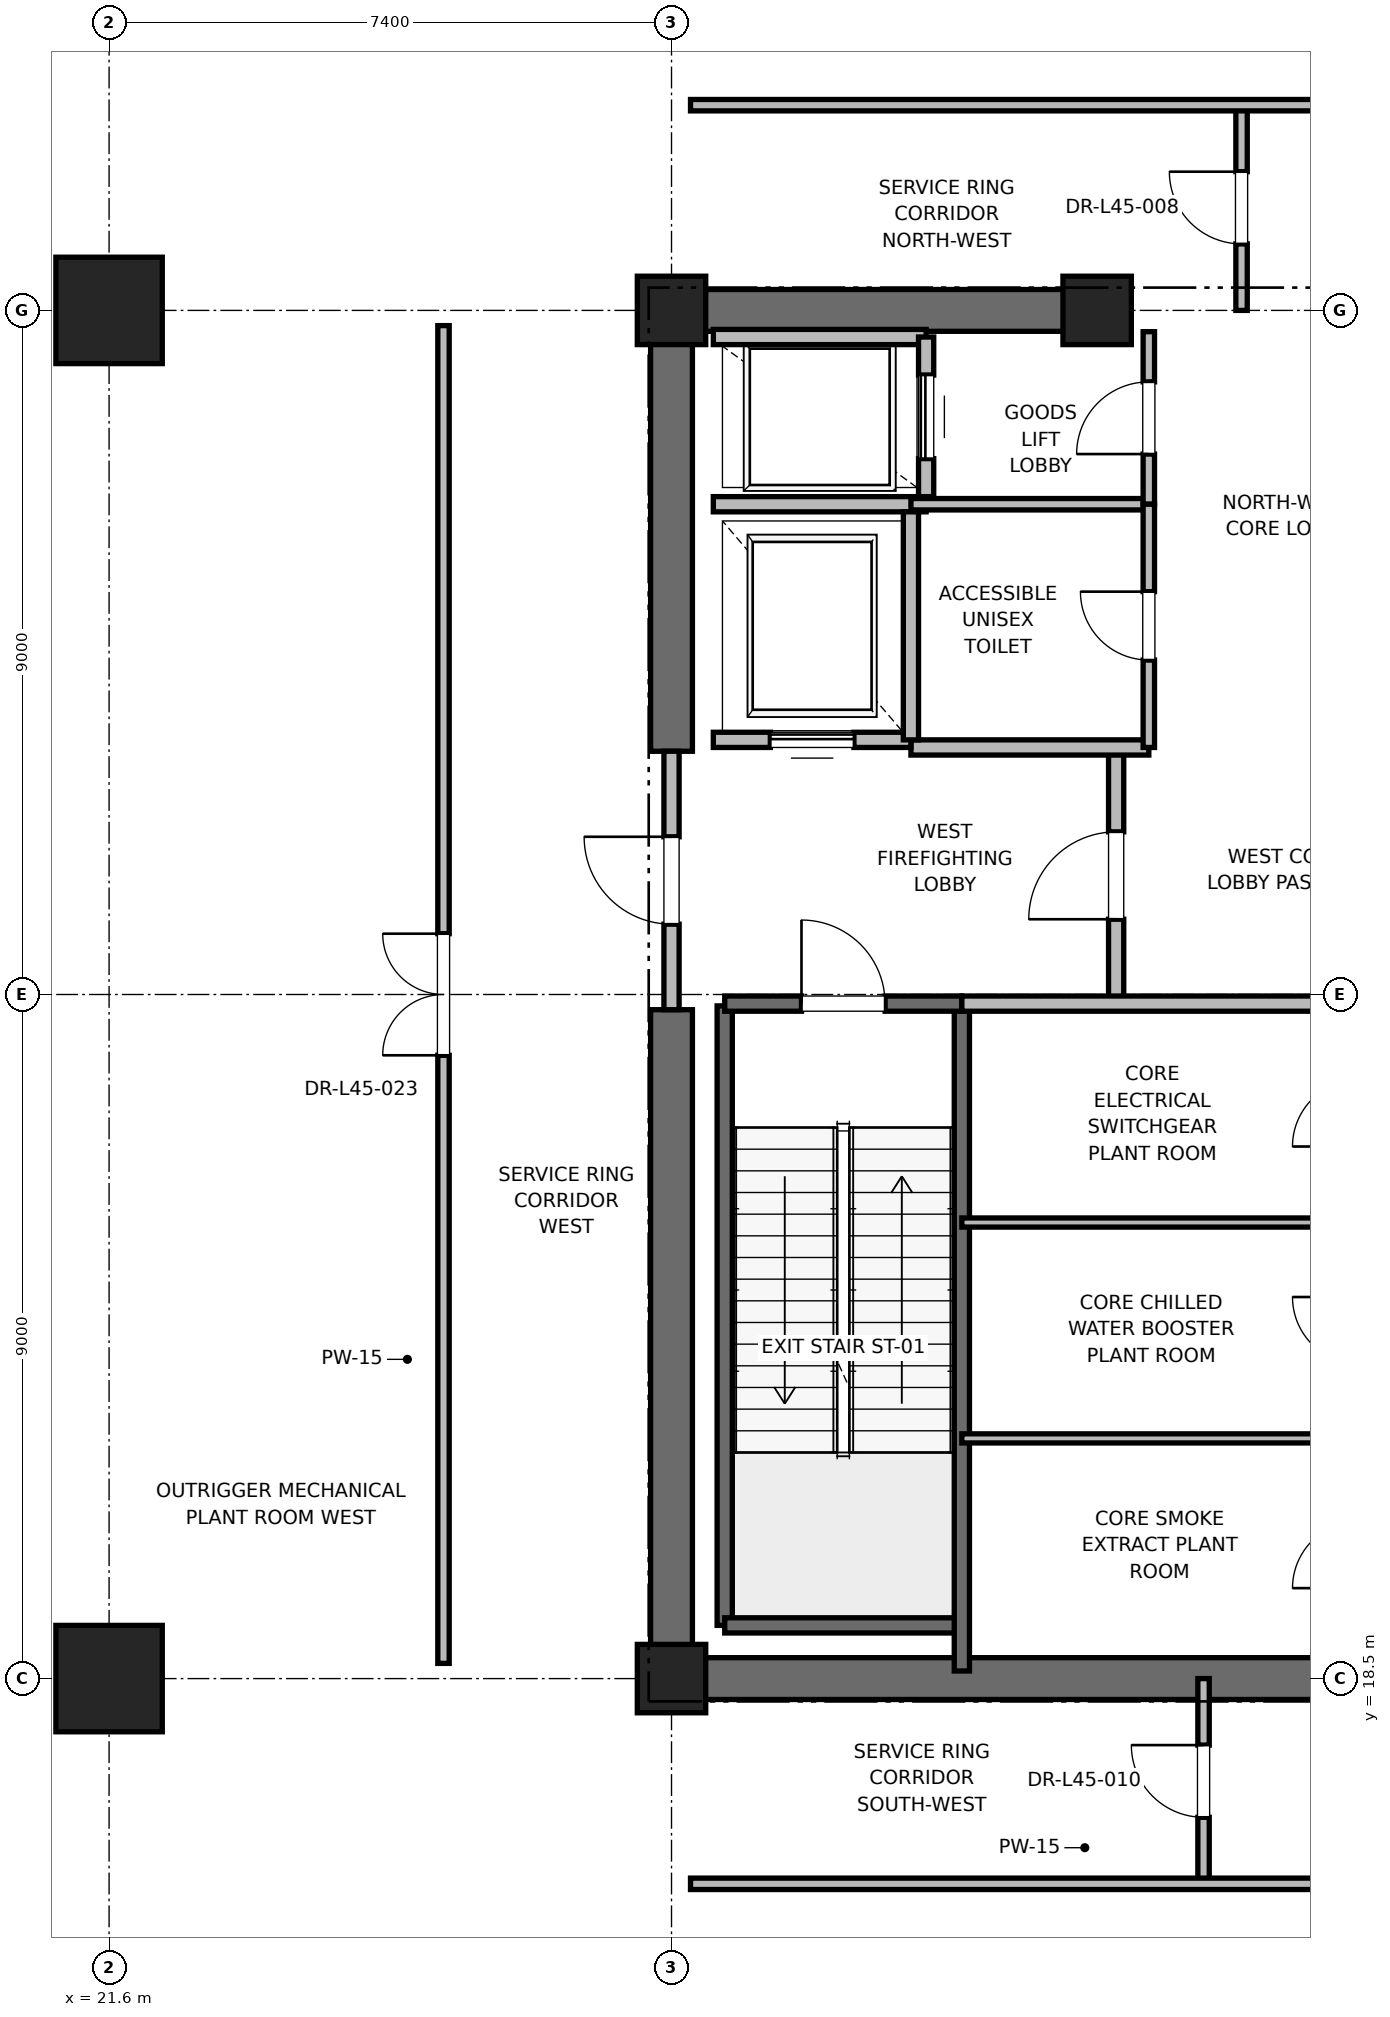
"""IFC4 building model, lengths in metres.
Left out: names, types, materials, properties, quantities, classifications, styles, units other than length and angle.
Written with IfcOpenShell. Run it as: python <this file> out.ifc"""

import sys

from ifc_helpers import new_model, si_unit, direction, frame, frame_2d, origin, origin_2d, place, context, subcontext, project, spatial, rectangle, extrude, element, fill, save


model = new_model("IFC4")
c1 = context("Model", 3, precision=1e-05, world=origin(), true_north=direction((0.0, 1.0)))
c2 = subcontext(c1, "Body", "Model", "MODEL_VIEW")
j1 = project(units=[si_unit("LENGTHUNIT", "METRE"), si_unit("PLANEANGLEUNIT", "RADIAN")], contexts=[c1])
p1 = place(None, origin())
s1 = spatial("IfcSite", under=j1, at=p1, CompositionType="ELEMENT")
p2 = place(p1, origin())
s2 = spatial("IfcBuilding", under=s1, at=p2, CompositionType="ELEMENT")
p3 = place(p2, frame((0.0, 0.0, 194.8)))
s3 = spatial("IfcBuildingStorey", under=s2, at=p3, CompositionType="ELEMENT", Elevation=194.8)
for number, where, z_axis, x_axis in (
    (1, (21.6, 18.5, 0.0), (0.0, 0.0, 1.0), (1.0, 0.0, 0.0)),
    (2, (21.6, 36.5, 0.0), (0.0, 0.0, 1.0), (1.0, 0.0, 0.0)),
):
    element("IfcColumn", number, at=place(p3, frame(where, z_axis=z_axis, x_axis=x_axis)), inside=s3, PredefinedType="COLUMN", context=c2, shape_type="SweptSolid", body=[
        extrude(rectangle(XDim=1.4, YDim=1.4, at=origin_2d()), origin(), (0.0, 0.0, 1.0), 5.4),
    ])
for number, where, z_axis, x_axis in (
    (3, (29.0, 18.5, 0.0), (0.0, 0.0, 1.0), (1.0, 0.0, 0.0)),
    (4, (29.0, 36.5, 0.0), (0.0, 0.0, 1.0), (1.0, 0.0, 0.0)),
    (5, (34.6, 36.5, 0.0), (0.0, 0.0, 1.0), (1.0, 0.0, 0.0)),
):
    element("IfcColumn", number, at=place(p3, frame(where, z_axis=z_axis, x_axis=x_axis)), inside=s3, PredefinedType="PILASTER", context=c2, shape_type="SweptSolid", body=[
        extrude(rectangle(XDim=0.9, YDim=0.9, at=origin_2d()), origin(), (0.0, 0.0, 1.0), 5.4),
    ])
p4 = place(p3, frame((29.0, 18.5, 0.0), z_axis=(0.0, 0.0, 1.0), x_axis=(1.0, 0.0, 0.0)))
e6 = element("IfcWall", 6, at=p4, inside=s3, PredefinedType="SHEAR", context=c2, shape_type="SweptSolid", body=[
    extrude(rectangle(XDim=9.2, YDim=0.55, at=frame_2d((4.6, 0.0))), origin(), (0.0, 0.0, 1.0), 5.1),
])
p5 = place(p3, frame((29.0, 36.5, 0.0), z_axis=(0.0, 0.0, 1.0), x_axis=(1.0, 0.0, 0.0)))
e7 = element("IfcWall", 7, at=p5, inside=s3, PredefinedType="SHEAR", context=c2, shape_type="SweptSolid", body=[
    extrude(rectangle(XDim=5.8, YDim=0.55, at=frame_2d((2.9, 0.0))), origin(), (0.0, 0.0, 1.0), 5.1),
])
p6 = place(p3, frame((29.0, 18.5, 0.0), z_axis=(0.0, 0.0, 1.0), x_axis=(0.0, 1.0, 0.0)))
e8 = element("IfcWall", 8, at=p6, inside=s3, PredefinedType="SHEAR", context=c2, shape_type="SweptSolid", body=[
    extrude(rectangle(XDim=8.8, YDim=0.55, at=frame_2d((4.4, 0.0))), origin(), (0.0, 0.0, 1.0), 5.1),
])
p7 = place(p3, frame((29.0, 30.7, 0.0), z_axis=(0.0, 0.0, 1.0), x_axis=(0.0, 1.0, 0.0)))
e9 = element("IfcWall", 9, at=p7, inside=s3, PredefinedType="SHEAR", context=c2, shape_type="SweptSolid", body=[
    extrude(rectangle(XDim=5.8, YDim=0.55, at=frame_2d((2.9, 0.0))), origin(), (0.0, 0.0, 1.0), 5.1),
])
p8 = place(p3, frame((29.7, 19.2, 0.0), z_axis=(0.0, 0.0, 1.0), x_axis=(0.0, 1.0, 0.0)))
e10 = element("IfcWall", 10, at=p8, inside=s3, PredefinedType="SOLIDWALL", context=c2, shape_type="SweptSolid", body=[
    extrude(rectangle(XDim=8.15, YDim=0.2, at=frame_2d((4.075, 0.0))), origin(), (0.0, 0.0, 1.0), 5.1),
])
p9 = place(p3, frame((29.7, 19.2, 0.0), z_axis=(0.0, 0.0, 1.0), x_axis=(1.0, 0.0, 0.0)))
e11 = element("IfcWall", 11, at=p9, inside=s3, PredefinedType="SOLIDWALL", context=c2, shape_type="SweptSolid", body=[
    extrude(rectangle(XDim=3.12, YDim=0.2, at=frame_2d((1.56, 0.0))), origin(), (0.0, 0.0, 1.0), 5.1),
])
p10 = place(p3, frame((32.82, 18.6, 0.0), z_axis=(0.0, 0.0, 1.0), x_axis=(0.0, 1.0, 0.0)))
e12 = element("IfcWall", 12, at=p10, inside=s3, PredefinedType="SOLIDWALL", context=c2, shape_type="SweptSolid", body=[
    extrude(rectangle(XDim=8.78, YDim=0.2, at=frame_2d((4.39, 0.0))), origin(), (0.0, 0.0, 1.0), 5.1),
])
p11 = place(p3, frame((29.7, 27.38, 0.0), z_axis=(0.0, 0.0, 1.0), x_axis=(1.0, 0.0, 0.0)))
e13 = element("IfcWall", 13, at=p11, inside=s3, PredefinedType="SOLIDWALL", context=c2, shape_type="SweptSolid", body=[
    extrude(rectangle(XDim=3.12, YDim=0.2, at=frame_2d((1.56, 0.0))), origin(), (0.0, 0.0, 1.0), 5.1),
])
p12 = place(p11, frame((1.01, 0.0, 0.0)))
e14 = element("IfcOpeningElement", 14, at=p12, cuts=e13, PredefinedType="OPENING", context=c2, shape_type="SweptSolid", body=[
    extrude(rectangle(XDim=1.1, YDim=2.15, at=frame_2d((0.55, 1.075))), frame((0.0, 0.1, 0.0), z_axis=(0.0, -1.0, 0.0), x_axis=(1.0, 0.0, 0.0)), (0.0, 0.0, 1.0), 0.2),
])
p13 = place(p3, frame((34.85, 27.38, 0.0), z_axis=(0.0, 0.0, 1.0), x_axis=(0.0, 1.0, 0.0)))
e15 = element("IfcWall", 15, at=p13, inside=s3, PredefinedType="PARTITIONING", context=c2, shape_type="SweptSolid", body=[
    extrude(rectangle(XDim=3.37, YDim=0.2, at=frame_2d((1.685, 0.0))), origin(), (0.0, 0.0, 1.0), 5.1),
])
p14 = place(p13, frame((1.11, 0.0, 0.0)))
e16 = element("IfcOpeningElement", 16, at=p14, cuts=e15, PredefinedType="OPENING", context=c2, shape_type="SweptSolid", body=[
    extrude(rectangle(XDim=1.15, YDim=2.2, at=frame_2d((0.575, 1.1))), frame((0.0, 0.1, 0.0), z_axis=(0.0, -1.0, 0.0), x_axis=(1.0, 0.0, 0.0)), (0.0, 0.0, 1.0), 0.2),
])
p15 = place(p3, frame((29.0, 27.3, 0.0), z_axis=(0.0, 0.0, 1.0), x_axis=(0.0, 1.0, 0.0)))
e17 = element("IfcWall", 17, at=p15, inside=s3, PredefinedType="PARTITIONING", context=c2, shape_type="SweptSolid", body=[
    extrude(rectangle(XDim=3.4, YDim=0.2, at=frame_2d((1.7, 0.0))), origin(), (0.0, 0.0, 1.0), 4.08),
])
p16 = place(p15, frame((1.125, 0.0, 0.0)))
e18 = element("IfcOpeningElement", 18, at=p16, cuts=e17, PredefinedType="OPENING", context=c2, shape_type="SweptSolid", body=[
    extrude(rectangle(XDim=1.15, YDim=2.2, at=frame_2d((0.575, 1.1))), frame((0.0, 0.1, 0.0), z_axis=(0.0, -1.0, 0.0), x_axis=(1.0, 0.0, 0.0)), (0.0, 0.0, 1.0), 0.2),
])
p17 = place(p3, frame((32.82, 27.38, 0.0), z_axis=(0.0, 0.0, 1.0), x_axis=(1.0, 0.0, 0.0)))
e19 = element("IfcWall", 19, at=p17, inside=s3, PredefinedType="PARTITIONING", context=c2, shape_type="SweptSolid", body=[
    extrude(rectangle(XDim=5.62, YDim=0.2, at=frame_2d((2.81, 0.0))), origin(), (0.0, 0.0, 1.0), 5.1),
])
p18 = place(p3, frame((32.15, 30.75, 0.0), z_axis=(0.0, 0.0, 1.0), x_axis=(1.0, 0.0, 0.0)))
e20 = element("IfcWall", 20, at=p18, inside=s3, PredefinedType="PARTITIONING", context=c2, shape_type="SweptSolid", body=[
    extrude(rectangle(XDim=3.13, YDim=0.2, at=frame_2d((1.565, 0.0))), origin(), (0.0, 0.0, 1.0), 5.1),
])
p19 = place(p3, frame((29.55, 30.85, 0.0), z_axis=(0.0, 0.0, 1.0), x_axis=(1.0, 0.0, 0.0)))
e21 = element("IfcWall", 21, at=p19, inside=s3, PredefinedType="SOLIDWALL", context=c2, shape_type="SweptSolid", body=[
    extrude(rectangle(XDim=2.6, YDim=0.2, at=frame_2d((1.3, 0.0))), origin(), (0.0, 0.0, 1.0), 4.08),
])
p20 = place(p19, frame((0.75, 0.0, 0.0)))
e22 = element("IfcOpeningElement", 22, at=p20, cuts=e21, PredefinedType="OPENING", context=c2, shape_type="SweptSolid", body=[
    extrude(rectangle(XDim=1.1, YDim=2.2, at=frame_2d((0.55, 1.1))), frame((0.0, 0.1, 0.0), z_axis=(0.0, -1.0, 0.0), x_axis=(1.0, 0.0, 0.0)), (0.0, 0.0, 1.0), 0.2),
])
p21 = place(p3, frame((29.55, 33.95, 0.0), z_axis=(0.0, 0.0, 1.0), x_axis=(1.0, 0.0, 0.0)))
e23 = element("IfcWall", 23, at=p21, inside=s3, PredefinedType="SOLIDWALL", context=c2, shape_type="SweptSolid", body=[
    extrude(rectangle(XDim=2.8, YDim=0.2, at=frame_2d((1.4, 0.0))), origin(), (0.0, 0.0, 1.0), 5.1),
])
p22 = place(p3, frame((32.15, 30.85, 0.0), z_axis=(0.0, 0.0, 1.0), x_axis=(0.0, 1.0, 0.0)))
e24 = element("IfcWall", 24, at=p22, inside=s3, PredefinedType="SOLIDWALL", context=c2, shape_type="SweptSolid", body=[
    extrude(rectangle(XDim=3.0, YDim=0.2, at=frame_2d((1.5, 0.0))), origin(), (0.0, 0.0, 1.0), 5.1),
])
p23 = place(p3, frame((32.35, 36.15, 0.0), z_axis=(0.0, 0.0, 1.0), x_axis=(-1.0, 0.0, 0.0)))
e25 = element("IfcWall", 25, at=p23, inside=s3, PredefinedType="SOLIDWALL", context=c2, shape_type="SweptSolid", body=[
    extrude(rectangle(XDim=2.8, YDim=0.2, at=frame_2d((1.4, 0.0))), origin(), (0.0, 0.0, 1.0), 4.153),
])
p24 = place(p3, frame((32.35, 34.05, 0.0), z_axis=(0.0, 0.0, 1.0), x_axis=(0.0, 1.0, 0.0)))
e26 = element("IfcWall", 26, at=p24, inside=s3, PredefinedType="SOLIDWALL", context=c2, shape_type="SweptSolid", body=[
    extrude(rectangle(XDim=2.1, YDim=0.2, at=frame_2d((1.05, 0.0))), origin(), (0.0, 0.0, 1.0), 5.1),
])
p25 = place(p24, frame((0.5, 0.0, 0.0)))
e27 = element("IfcOpeningElement", 27, at=p25, cuts=e26, PredefinedType="OPENING", context=c2, shape_type="SweptSolid", body=[
    extrude(rectangle(XDim=1.1, YDim=2.2, at=frame_2d((0.55, 1.1))), frame((0.0, 0.1, 0.0), z_axis=(0.0, -1.0, 0.0), x_axis=(1.0, 0.0, 0.0)), (0.0, 0.0, 1.0), 0.2),
])
p26 = place(p3, frame((32.15, 33.95, 0.0), z_axis=(0.0, 0.0, 1.0), x_axis=(1.0, 0.0, 0.0)))
e28 = element("IfcWall", 28, at=p26, inside=s3, PredefinedType="PARTITIONING", context=c2, shape_type="SweptSolid", body=[
    extrude(rectangle(XDim=3.13, YDim=0.15, at=frame_2d((1.565, 0.0))), origin(), (0.0, 0.0, 1.0), 2.85),
])
p27 = place(p3, frame((35.28, 33.95, 0.0), z_axis=(0.0, 0.0, 1.0), x_axis=(0.0, 1.0, 0.0)))
e29 = element("IfcWall", 29, at=p27, inside=s3, PredefinedType="PARTITIONING", context=c2, shape_type="SweptSolid", body=[
    extrude(rectangle(XDim=2.27, YDim=0.15, at=frame_2d((1.135, 0.0))), origin(), (0.0, 0.0, 1.0), 2.85),
])
p28 = place(p27, frame((0.66, 0.0, 0.0)))
e30 = element("IfcOpeningElement", 30, at=p28, cuts=e29, PredefinedType="OPENING", context=c2, shape_type="SweptSolid", body=[
    extrude(rectangle(XDim=0.95, YDim=2.15, at=frame_2d((0.475, 1.075))), frame((0.0, 0.075, 0.0), z_axis=(0.0, -1.0, 0.0), x_axis=(1.0, 0.0, 0.0)), (0.0, 0.0, 1.0), 0.15),
])
p29 = place(p3, frame((35.28, 30.75, 0.0), z_axis=(0.0, 0.0, 1.0), x_axis=(0.0, 1.0, 0.0)))
e31 = element("IfcWall", 31, at=p29, inside=s3, PredefinedType="PARTITIONING", context=c2, shape_type="SweptSolid", body=[
    extrude(rectangle(XDim=3.2, YDim=0.15, at=frame_2d((1.6, 0.0))), origin(), (0.0, 0.0, 1.0), 2.85),
])
p30 = place(p29, frame((1.15, 0.0, 0.0)))
e32 = element("IfcOpeningElement", 32, at=p30, cuts=e31, PredefinedType="OPENING", context=c2, shape_type="SweptSolid", body=[
    extrude(rectangle(XDim=0.9, YDim=2.1, at=frame_2d((0.45, 1.05))), frame((0.0, 0.075, 0.0), z_axis=(0.0, -1.0, 0.0), x_axis=(1.0, 0.0, 0.0)), (0.0, 0.0, 1.0), 0.15),
])
for number, where, z_axis, x_axis in (
    (33, (32.82, 21.66, 0.0), (0.0, 0.0, 1.0), (1.0, 0.0, 0.0)),
    (34, (32.82, 24.5, 0.0), (0.0, 0.0, 1.0), (1.0, 0.0, 0.0)),
):
    element("IfcWall", number, at=place(p3, frame(where, z_axis=z_axis, x_axis=x_axis)), inside=s3, PredefinedType="PARTITIONING", context=c2, shape_type="SweptSolid", body=[
        extrude(rectangle(XDim=5.23, YDim=0.12, at=frame_2d((2.615, 0.0))), origin(), (0.0, 0.0, 1.0), 2.85),
    ])
p31 = place(p3, frame((36.5, 36.5, 0.0), z_axis=(0.0, 0.0, 1.0), x_axis=(0.0, 1.0, 0.0)))
e35 = element("IfcWall", 35, at=p31, inside=s3, PredefinedType="PARTITIONING", context=c2, shape_type="SweptSolid", body=[
    extrude(rectangle(XDim=2.7, YDim=0.15, at=frame_2d((1.35, 0.0))), origin(), (0.0, 0.0, 1.0), 2.85),
])
p32 = place(p31, frame((0.875, 0.0, 0.0)))
e36 = element("IfcOpeningElement", 36, at=p32, cuts=e35, PredefinedType="OPENING", context=c2, shape_type="SweptSolid", body=[
    extrude(rectangle(XDim=0.95, YDim=2.15, at=frame_2d((0.475, 1.075))), frame((0.0, 0.075, 0.0), z_axis=(0.0, -1.0, 0.0), x_axis=(1.0, 0.0, 0.0)), (0.0, 0.0, 1.0), 0.15),
])
p33 = place(p3, frame((36.0, 15.8, 0.0), z_axis=(0.0, 0.0, 1.0), x_axis=(0.0, 1.0, 0.0)))
e37 = element("IfcWall", 37, at=p33, inside=s3, PredefinedType="PARTITIONING", context=c2, shape_type="SweptSolid", body=[
    extrude(rectangle(XDim=2.7, YDim=0.15, at=frame_2d((1.35, 0.0))), origin(), (0.0, 0.0, 1.0), 2.85),
])
p34 = place(p33, frame((0.875, 0.0, 0.0)))
e38 = element("IfcOpeningElement", 38, at=p34, cuts=e37, PredefinedType="OPENING", context=c2, shape_type="SweptSolid", body=[
    extrude(rectangle(XDim=0.95, YDim=2.15, at=frame_2d((0.475, 1.075))), frame((0.0, 0.075, 0.0), z_axis=(0.0, -1.0, 0.0), x_axis=(1.0, 0.0, 0.0)), (0.0, 0.0, 1.0), 0.15),
])
p35 = place(p3, frame((29.25, 39.2, 0.0), z_axis=(0.0, 0.0, 1.0), x_axis=(1.0, 0.0, 0.0)))
e39 = element("IfcWall", 39, at=p35, inside=s3, PredefinedType="PARTITIONING", context=c2, shape_type="SweptSolid", body=[
    extrude(rectangle(XDim=21.5, YDim=0.15, at=frame_2d((10.75, 0.0))), origin(), (0.0, 0.0, 1.0), 2.85),
])
p36 = place(p35, frame((10.275, 0.0, 0.0)))
e40 = element("IfcOpeningElement", 40, at=p36, cuts=e39, PredefinedType="OPENING", context=c2, shape_type="SweptSolid", body=[
    extrude(rectangle(XDim=0.95, YDim=2.15, at=frame_2d((0.475, 1.075))), frame((0.0, 0.075, 0.0), z_axis=(0.0, -1.0, 0.0), x_axis=(1.0, 0.0, 0.0)), (0.0, 0.0, 1.0), 0.15),
])
p37 = place(p3, frame((29.25, 15.8, 0.0), z_axis=(0.0, 0.0, 1.0), x_axis=(1.0, 0.0, 0.0)))
e41 = element("IfcWall", 41, at=p37, inside=s3, PredefinedType="PARTITIONING", context=c2, shape_type="SweptSolid", body=[
    extrude(rectangle(XDim=21.5, YDim=0.15, at=frame_2d((10.75, 0.0))), origin(), (0.0, 0.0, 1.0), 2.85),
])
p38 = place(p37, frame((10.375, 0.0, 0.0)))
e42 = element("IfcOpeningElement", 42, at=p38, cuts=e41, PredefinedType="OPENING", context=c2, shape_type="SweptSolid", body=[
    extrude(rectangle(XDim=0.95, YDim=2.15, at=frame_2d((0.475, 1.075))), frame((0.0, 0.075, 0.0), z_axis=(0.0, -1.0, 0.0), x_axis=(1.0, 0.0, 0.0)), (0.0, 0.0, 1.0), 0.15),
])
p39 = place(p3, frame((26.0, 18.7, 0.0), z_axis=(0.0, 0.0, 1.0), x_axis=(0.0, 1.0, 0.0)))
e43 = element("IfcWall", 43, at=p39, inside=s3, PredefinedType="PARTITIONING", context=c2, shape_type="SweptSolid", body=[
    extrude(rectangle(XDim=17.6, YDim=0.15, at=frame_2d((8.8, 0.0))), origin(), (0.0, 0.0, 1.0), 2.85),
])
p40 = place(p39, frame((8.0, 0.0, 0.0)))
e44 = element("IfcOpeningElement", 44, at=p40, cuts=e43, PredefinedType="OPENING", context=c2, shape_type="SweptSolid", body=[
    extrude(rectangle(XDim=1.6, YDim=2.25, at=frame_2d((0.8, 1.125))), frame((0.0, 0.075, 0.0), z_axis=(0.0, -1.0, 0.0), x_axis=(1.0, 0.0, 0.0)), (0.0, 0.0, 1.0), 0.15),
])
p41 = place(p12, origin())
e45 = element("IfcDoor", 45, at=p41, inside=s3, OperationType="SINGLE_SWING_LEFT", PredefinedType="DOOR", context=c2, shape_type="SweptSolid", body=[
    extrude(rectangle(XDim=1.1, YDim=2.15, at=frame_2d((0.55, 1.075))), frame((0.0, 0.025, 0.0), z_axis=(0.0, -1.0, 0.0), x_axis=(1.0, 0.0, 0.0)), (0.0, 0.0, 1.0), 0.05),
])
fill(e14, e45)
p42 = place(p14, origin())
e46 = element("IfcDoor", 46, at=p42, inside=s3, OperationType="SINGLE_SWING_LEFT", PredefinedType="DOOR", context=c2, shape_type="SweptSolid", body=[
    extrude(rectangle(XDim=1.15, YDim=2.2, at=frame_2d((0.575, 1.1))), frame((0.0, 0.025, 0.0), z_axis=(0.0, -1.0, 0.0), x_axis=(1.0, 0.0, 0.0)), (0.0, 0.0, 1.0), 0.05),
])
fill(e16, e46)
p43 = place(p16, origin())
e47 = element("IfcDoor", 47, at=p43, inside=s3, OperationType="SINGLE_SWING_RIGHT", PredefinedType="DOOR", context=c2, shape_type="SweptSolid", body=[
    extrude(rectangle(XDim=1.15, YDim=2.2, at=frame_2d((0.575, 1.1))), frame((0.0, 0.025, 0.0), z_axis=(0.0, -1.0, 0.0), x_axis=(1.0, 0.0, 0.0)), (0.0, 0.0, 1.0), 0.05),
])
fill(e18, e47)
p44 = place(p20, origin())
e48 = element("IfcDoor", 48, at=p44, inside=s3, OperationType="SLIDING_TO_RIGHT", PredefinedType="DOOR", context=c2, shape_type="SweptSolid", body=[
    extrude(rectangle(XDim=1.1, YDim=2.2, at=frame_2d((0.55, 1.1))), frame((0.0, 0.025, 0.0), z_axis=(0.0, -1.0, 0.0), x_axis=(1.0, 0.0, 0.0)), (0.0, 0.0, 1.0), 0.05),
])
fill(e22, e48)
p45 = place(p25, origin())
e49 = element("IfcDoor", 49, at=p45, inside=s3, OperationType="SLIDING_TO_RIGHT", PredefinedType="DOOR", context=c2, shape_type="SweptSolid", body=[
    extrude(rectangle(XDim=1.1, YDim=2.2, at=frame_2d((0.55, 1.1))), frame((0.0, 0.025, 0.0), z_axis=(0.0, -1.0, 0.0), x_axis=(1.0, 0.0, 0.0)), (0.0, 0.0, 1.0), 0.05),
])
fill(e27, e49)
p46 = place(p28, origin())
e50 = element("IfcDoor", 50, at=p46, inside=s3, OperationType="SINGLE_SWING_LEFT", PredefinedType="DOOR", context=c2, shape_type="SweptSolid", body=[
    extrude(rectangle(XDim=0.95, YDim=2.15, at=frame_2d((0.475, 1.075))), frame((0.0, 0.025, 0.0), z_axis=(0.0, -1.0, 0.0), x_axis=(1.0, 0.0, 0.0)), (0.0, 0.0, 1.0), 0.05),
])
fill(e30, e50)
p47 = place(p30, origin())
e51 = element("IfcDoor", 51, at=p47, inside=s3, OperationType="SINGLE_SWING_RIGHT", PredefinedType="DOOR", context=c2, shape_type="SweptSolid", body=[
    extrude(rectangle(XDim=0.9, YDim=2.1, at=frame_2d((0.45, 1.05))), frame((0.0, 0.025, 0.0), z_axis=(0.0, -1.0, 0.0), x_axis=(1.0, 0.0, 0.0)), (0.0, 0.0, 1.0), 0.05),
])
fill(e32, e51)
p48 = place(p32, origin())
e52 = element("IfcDoor", 52, at=p48, inside=s3, OperationType="SINGLE_SWING_RIGHT", PredefinedType="DOOR", context=c2, shape_type="SweptSolid", body=[
    extrude(rectangle(XDim=0.95, YDim=2.15, at=frame_2d((0.475, 1.075))), frame((0.0, 0.025, 0.0), z_axis=(0.0, -1.0, 0.0), x_axis=(1.0, 0.0, 0.0)), (0.0, 0.0, 1.0), 0.05),
])
fill(e36, e52)
p49 = place(p34, origin())
e53 = element("IfcDoor", 53, at=p49, inside=s3, OperationType="SINGLE_SWING_RIGHT", PredefinedType="DOOR", context=c2, shape_type="SweptSolid", body=[
    extrude(rectangle(XDim=0.95, YDim=2.15, at=frame_2d((0.475, 1.075))), frame((0.0, 0.025, 0.0), z_axis=(0.0, -1.0, 0.0), x_axis=(1.0, 0.0, 0.0)), (0.0, 0.0, 1.0), 0.05),
])
fill(e38, e53)
p50 = place(p40, origin())
e54 = element("IfcDoor", 54, at=p50, inside=s3, OperationType="DOUBLE_DOOR_SINGLE_SWING", PredefinedType="DOOR", context=c2, shape_type="SweptSolid", body=[
    extrude(rectangle(XDim=1.6, YDim=2.25, at=frame_2d((0.8, 1.125))), frame((0.0, 0.025, 0.0), z_axis=(0.0, -1.0, 0.0), x_axis=(1.0, 0.0, 0.0)), (0.0, 0.0, 1.0), 0.05),
])
fill(e44, e54)
save(model, sys.argv[1])
